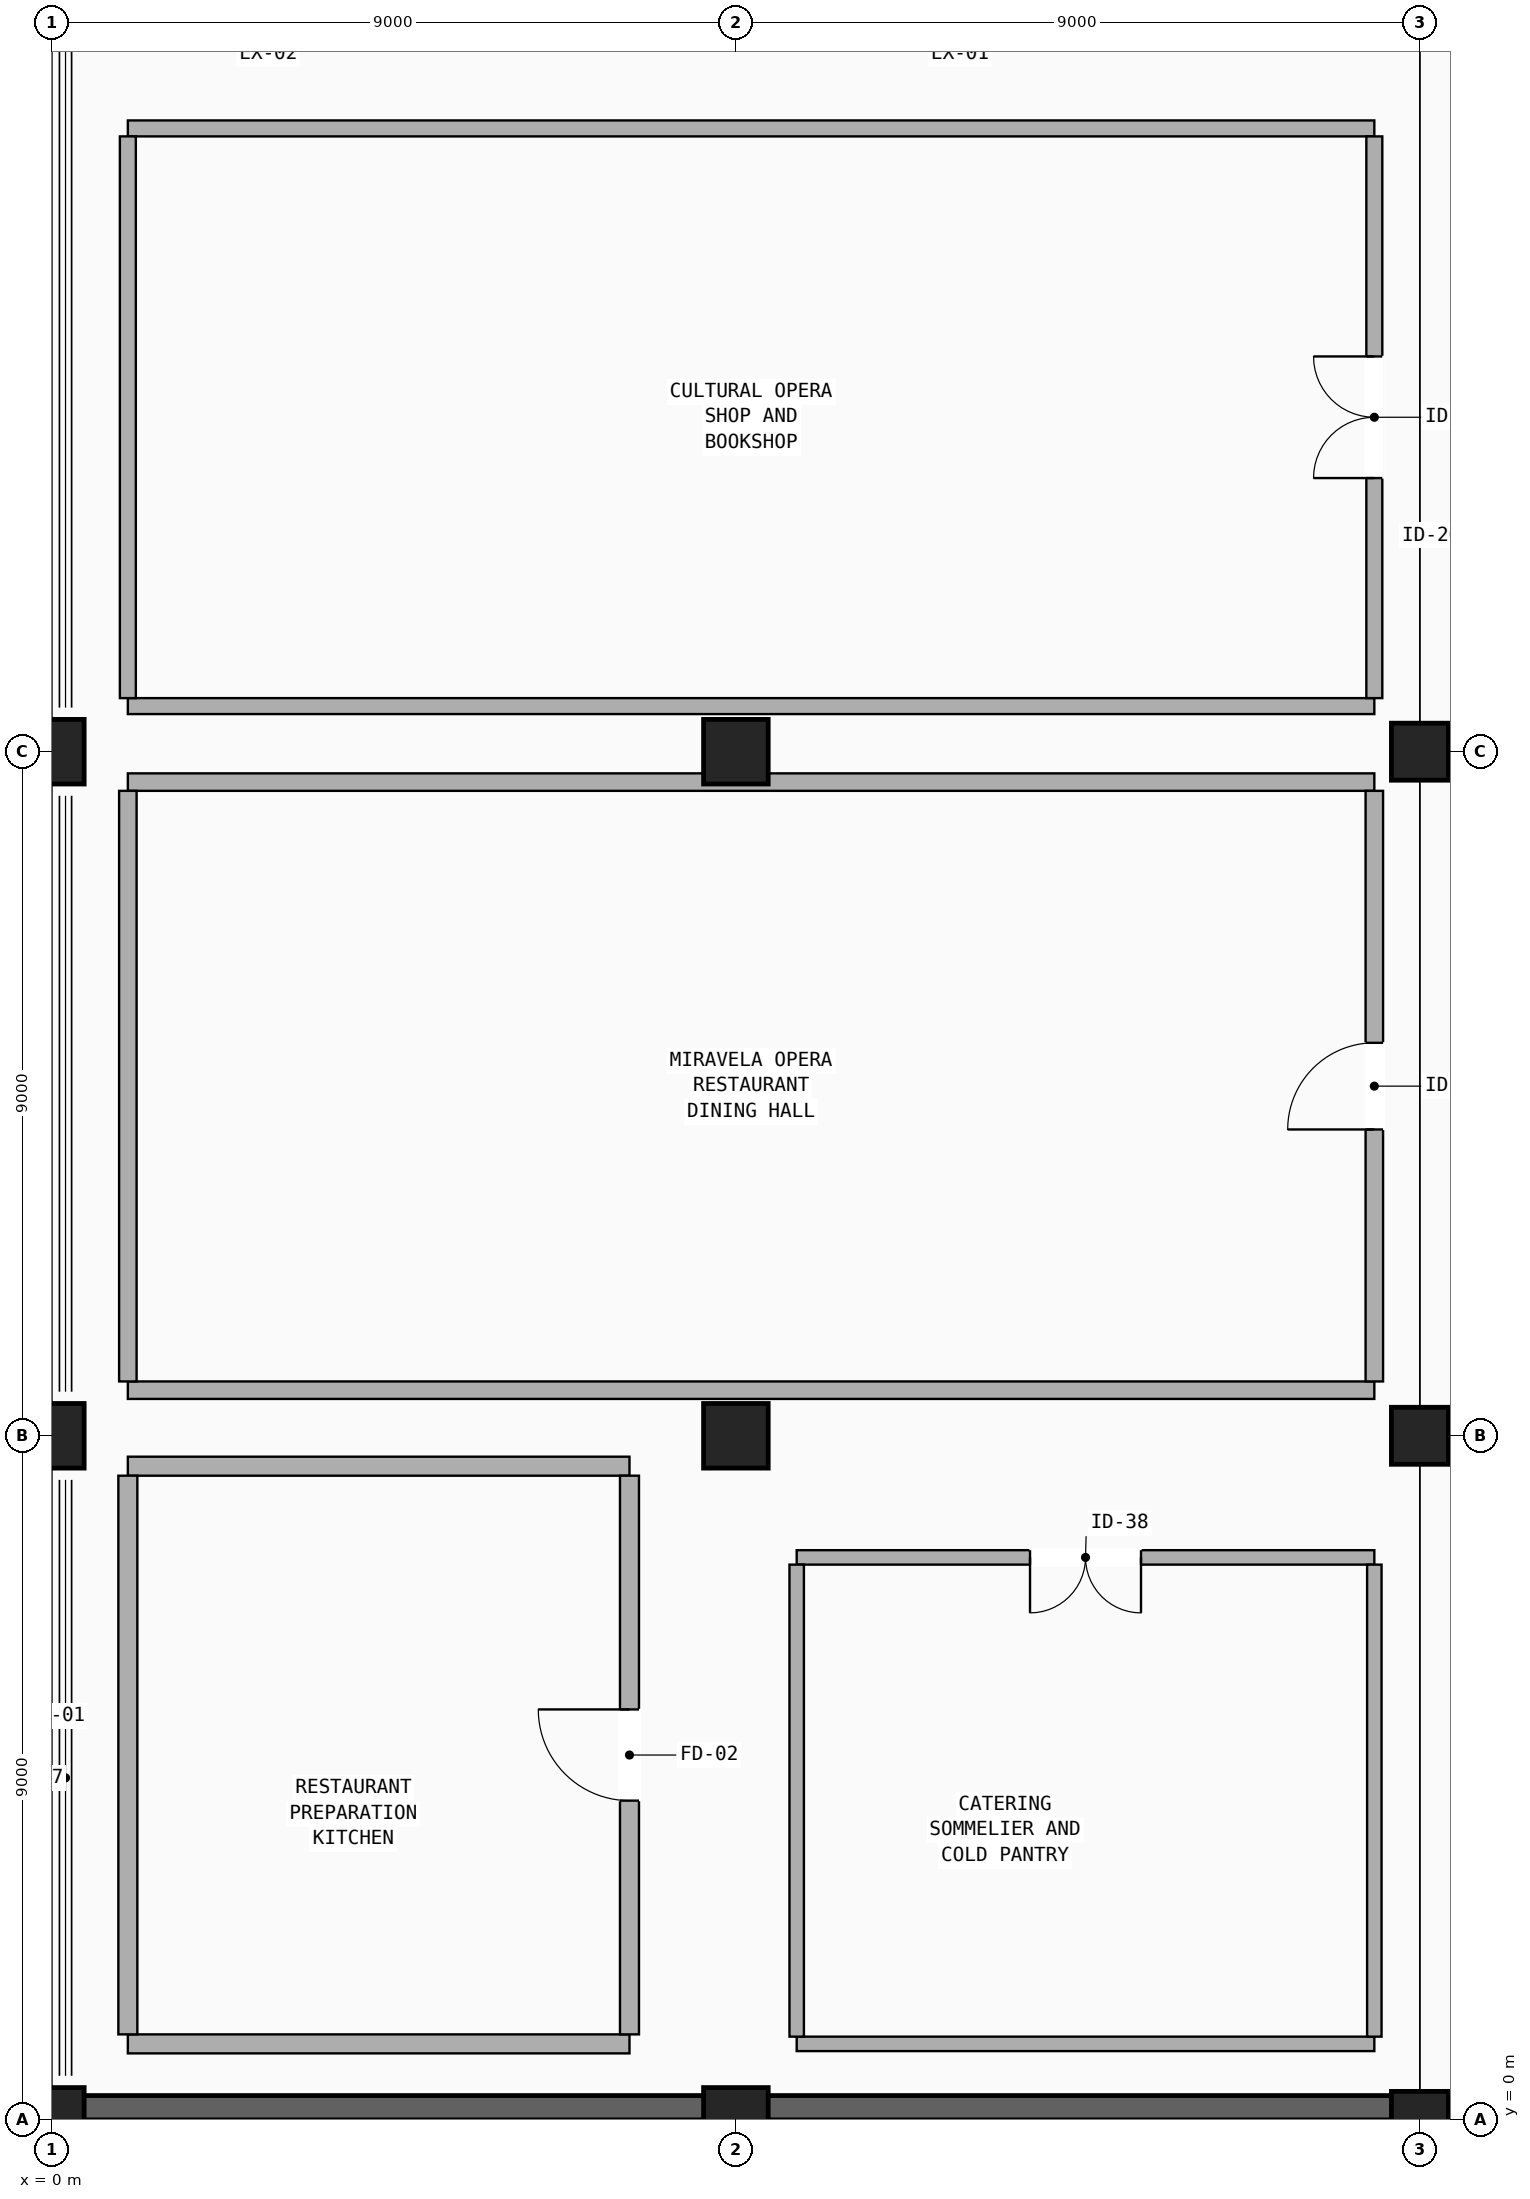
"""IFC4 building model, lengths in metres.
Left out: names, types, materials, properties, quantities, classifications, styles, units other than length and angle.
Written with IfcOpenShell. Run it as: python <this file> out.ifc"""

import sys

from ifc_helpers import new_model, si_unit, direction, frame, frame_2d, origin, origin_2d, place, context, subcontext, project, spatial, rectangle, circle, extrude, element, fill, save


model = new_model("IFC4")
c1 = context("Model", 3, precision=1e-05, world=origin(), true_north=direction((0.0, 1.0)))
c2 = subcontext(c1, "Body", "Model", "MODEL_VIEW")
j1 = project(units=[si_unit("LENGTHUNIT", "METRE"), si_unit("PLANEANGLEUNIT", "RADIAN")], contexts=[c1])
p1 = place(None, origin())
s1 = spatial("IfcSite", under=j1, at=p1, CompositionType="ELEMENT")
p2 = place(p1, origin())
s2 = spatial("IfcBuilding", under=s1, at=p2, CompositionType="ELEMENT")
p3 = place(p2, origin())
s3 = spatial("IfcBuildingStorey", under=s2, at=p3, CompositionType="ELEMENT", Elevation=0.0)
for number, where, z_axis, x_axis in (
    (1, (0.0, 0.0, 0.0), (0.0, 0.0, 1.0), (1.0, 0.0, 0.0)),
    (2, (0.0, 9.0, 0.0), (0.0, 0.0, 1.0), (1.0, 0.0, 0.0)),
    (3, (0.0, 18.0, 0.0), (0.0, 0.0, 1.0), (1.0, 0.0, 0.0)),
    (4, (9.0, 0.0, 0.0), (0.0, 0.0, 1.0), (1.0, 0.0, 0.0)),
    (5, (9.0, 9.0, 0.0), (0.0, 0.0, 1.0), (1.0, 0.0, 0.0)),
    (6, (9.0, 18.0, 0.0), (0.0, 0.0, 1.0), (1.0, 0.0, 0.0)),
):
    element("IfcColumn", number, at=place(p3, frame(where, z_axis=z_axis, x_axis=x_axis)), inside=s3, PredefinedType="COLUMN", context=c2, shape_type="SweptSolid", body=[
        extrude(circle(Radius=0.425, at=origin_2d()), origin(), (0.0, 0.0, 1.0), 5.1),
    ])
for number, where, z_axis, x_axis in (
    (7, (18.0, 0.0, 0.0), (0.0, 0.0, 1.0), (1.0, 0.0, 0.0)),
    (8, (18.0, 9.0, 0.0), (0.0, 0.0, 1.0), (1.0, 0.0, 0.0)),
    (9, (18.0, 18.0, 0.0), (0.0, 0.0, 1.0), (1.0, 0.0, 0.0)),
):
    element("IfcColumn", number, at=place(p3, frame(where, z_axis=z_axis, x_axis=x_axis)), inside=s3, PredefinedType="COLUMN", context=c2, shape_type="SweptSolid", body=[
        extrude(rectangle(XDim=0.75, YDim=0.75, at=origin_2d()), origin(), (0.0, 0.0, 1.0), 5.1),
    ])
p4 = place(p3, frame((0.35, 0.16, 0.0), z_axis=(0.0, 0.0, 1.0), x_axis=(1.0, 0.0, 0.0)))
e10 = element("IfcWall", 10, at=p4, inside=s3, PredefinedType="SHEAR", context=c2, shape_type="SweptSolid", body=[
    extrude(rectangle(XDim=62.95, YDim=0.32, at=frame_2d((31.475, 0.0))), origin(), (0.0, 0.0, 1.0), 5.1),
])
for number, where, z_axis, x_axis in (
    (11, (1.0, 18.6, 0.0), (0.0, 0.0, 1.0), (1.0, 0.0, 0.0)),
    (12, (1.0, 26.2, 0.0), (0.0, 0.0, 1.0), (1.0, 0.0, 0.0)),
):
    element("IfcWall", number, at=place(p3, frame(where, z_axis=z_axis, x_axis=x_axis)), inside=s3, PredefinedType="PARTITIONING", context=c2, shape_type="SweptSolid", body=[
        extrude(rectangle(XDim=16.4, YDim=0.21, at=frame_2d((8.2, 0.0))), origin(), (0.0, 0.0, 1.0), 3.98),
    ])
p5 = place(p3, frame((1.0, 18.705, 0.0), z_axis=(0.0, 0.0, 1.0), x_axis=(0.0, 1.0, 0.0)))
e13 = element("IfcWall", 13, at=p5, inside=s3, PredefinedType="PARTITIONING", context=c2, shape_type="SweptSolid", body=[
    extrude(rectangle(XDim=7.39, YDim=0.21, at=frame_2d((3.695, 0.0))), origin(), (0.0, 0.0, 1.0), 4.222),
])
p6 = place(p3, frame((17.4, 18.705, 0.0), z_axis=(0.0, 0.0, 1.0), x_axis=(0.0, 1.0, 0.0)))
e14 = element("IfcWall", 14, at=p6, inside=s3, PredefinedType="PARTITIONING", context=c2, shape_type="SweptSolid", body=[
    extrude(rectangle(XDim=7.39, YDim=0.21, at=frame_2d((3.695, 0.0))), origin(), (0.0, 0.0, 1.0), 4.37),
])
p7 = place(p6, frame((2.895, 0.0, 0.0)))
e15 = element("IfcOpeningElement", 15, at=p7, cuts=e14, PredefinedType="OPENING", context=c2, shape_type="SweptSolid", body=[
    extrude(rectangle(XDim=1.6, YDim=2.25, at=frame_2d((0.8, 1.125))), frame((0.0, 0.115, 0.0), z_axis=(0.0, -1.0, 0.0), x_axis=(1.0, 0.0, 0.0)), (0.0, 0.0, 1.0), 0.23),
])
p8 = place(p3, frame((1.0, 9.6, 0.0), z_axis=(0.0, 0.0, 1.0), x_axis=(1.0, 0.0, 0.0)))
e16 = element("IfcWall", 16, at=p8, inside=s3, PredefinedType="PARTITIONING", context=c2, shape_type="SweptSolid", body=[
    extrude(rectangle(XDim=16.4, YDim=0.23, at=frame_2d((8.2, 0.0))), origin(), (0.0, 0.0, 1.0), 4.18),
])
p9 = place(p3, frame((1.0, 17.6, 0.0), z_axis=(0.0, 0.0, 1.0), x_axis=(1.0, 0.0, 0.0)))
e17 = element("IfcWall", 17, at=p9, inside=s3, PredefinedType="PARTITIONING", context=c2, shape_type="SweptSolid", body=[
    extrude(rectangle(XDim=16.4, YDim=0.23, at=frame_2d((8.2, 0.0))), origin(), (0.0, 0.0, 1.0), 3.83),
])
p10 = place(p3, frame((1.0, 9.715, 0.0), z_axis=(0.0, 0.0, 1.0), x_axis=(0.0, 1.0, 0.0)))
e18 = element("IfcWall", 18, at=p10, inside=s3, PredefinedType="PARTITIONING", context=c2, shape_type="SweptSolid", body=[
    extrude(rectangle(XDim=7.77, YDim=0.23, at=frame_2d((3.885, 0.0))), origin(), (0.0, 0.0, 1.0), 4.297),
])
p11 = place(p3, frame((17.4, 9.715, 0.0), z_axis=(0.0, 0.0, 1.0), x_axis=(0.0, 1.0, 0.0)))
e19 = element("IfcWall", 19, at=p11, inside=s3, PredefinedType="PARTITIONING", context=c2, shape_type="SweptSolid", body=[
    extrude(rectangle(XDim=7.77, YDim=0.23, at=frame_2d((3.885, 0.0))), origin(), (0.0, 0.0, 1.0), 4.48),
])
p12 = place(p11, frame((3.315, 0.0, 0.0)))
e20 = element("IfcOpeningElement", 20, at=p12, cuts=e19, PredefinedType="OPENING", context=c2, shape_type="SweptSolid", body=[
    extrude(rectangle(XDim=1.14, YDim=2.08, at=frame_2d((0.57, 1.04))), frame((0.0, 0.125, 0.0), z_axis=(0.0, -1.0, 0.0), x_axis=(1.0, 0.0, 0.0)), (0.0, 0.0, 1.0), 0.25),
])
p13 = place(p3, frame((1.0, 1.0, 0.0), z_axis=(0.0, 0.0, 1.0), x_axis=(1.0, 0.0, 0.0)))
e21 = element("IfcWall", 21, at=p13, inside=s3, PredefinedType="PARTITIONING", context=c2, shape_type="SweptSolid", body=[
    extrude(rectangle(XDim=6.6, YDim=0.25, at=frame_2d((3.3, 0.0))), origin(), (0.0, 0.0, 1.0), 4.85),
])
p14 = place(p3, frame((1.0, 8.6, 0.0), z_axis=(0.0, 0.0, 1.0), x_axis=(1.0, 0.0, 0.0)))
e22 = element("IfcWall", 22, at=p14, inside=s3, PredefinedType="PARTITIONING", context=c2, shape_type="SweptSolid", body=[
    extrude(rectangle(XDim=6.6, YDim=0.25, at=frame_2d((3.3, 0.0))), origin(), (0.0, 0.0, 1.0), 4.08),
])
p15 = place(p3, frame((1.0, 1.125, 0.0), z_axis=(0.0, 0.0, 1.0), x_axis=(0.0, 1.0, 0.0)))
e23 = element("IfcWall", 23, at=p15, inside=s3, PredefinedType="PARTITIONING", context=c2, shape_type="SweptSolid", body=[
    extrude(rectangle(XDim=7.35, YDim=0.25, at=frame_2d((3.675, 0.0))), origin(), (0.0, 0.0, 1.0), 4.522),
])
p16 = place(p3, frame((7.6, 1.125, 0.0), z_axis=(0.0, 0.0, 1.0), x_axis=(0.0, 1.0, 0.0)))
e24 = element("IfcWall", 24, at=p16, inside=s3, PredefinedType="PARTITIONING", context=c2, shape_type="SweptSolid", body=[
    extrude(rectangle(XDim=7.35, YDim=0.25, at=frame_2d((3.675, 0.0))), origin(), (0.0, 0.0, 1.0), 4.522),
])
p17 = place(p16, frame((3.075, 0.0, 0.0)))
e25 = element("IfcOpeningElement", 25, at=p17, cuts=e24, PredefinedType="OPENING", context=c2, shape_type="SweptSolid", body=[
    extrude(rectangle(XDim=1.2, YDim=2.2, at=frame_2d((0.6, 1.1))), frame((0.0, 0.135, 0.0), z_axis=(0.0, -1.0, 0.0), x_axis=(1.0, 0.0, 0.0)), (0.0, 0.0, 1.0), 0.27),
])
p18 = place(p3, frame((9.8, 1.0, 0.0), z_axis=(0.0, 0.0, 1.0), x_axis=(1.0, 0.0, 0.0)))
e26 = element("IfcWall", 26, at=p18, inside=s3, PredefinedType="PARTITIONING", context=c2, shape_type="SweptSolid", body=[
    extrude(rectangle(XDim=7.6, YDim=0.19, at=frame_2d((3.8, 0.0))), origin(), (0.0, 0.0, 1.0), 4.85),
])
p19 = place(p3, frame((9.8, 7.4, 0.0), z_axis=(0.0, 0.0, 1.0), x_axis=(1.0, 0.0, 0.0)))
e27 = element("IfcWall", 27, at=p19, inside=s3, PredefinedType="PARTITIONING", context=c2, shape_type="SweptSolid", body=[
    extrude(rectangle(XDim=7.6, YDim=0.19, at=frame_2d((3.8, 0.0))), origin(), (0.0, 0.0, 1.0), 4.85),
])
p20 = place(p19, frame((3.07, 0.0, 0.0)))
e28 = element("IfcOpeningElement", 28, at=p20, cuts=e27, PredefinedType="OPENING", context=c2, shape_type="SweptSolid", body=[
    extrude(rectangle(XDim=1.46, YDim=2.14, at=frame_2d((0.73, 1.07))), frame((0.0, 0.105, 0.0), z_axis=(0.0, -1.0, 0.0), x_axis=(1.0, 0.0, 0.0)), (0.0, 0.0, 1.0), 0.21),
])
for number, where, z_axis, x_axis in (
    (29, (9.8, 1.095, 0.0), (0.0, 0.0, 1.0), (0.0, 1.0, 0.0)),
    (30, (17.4, 1.095, 0.0), (0.0, 0.0, 1.0), (0.0, 1.0, 0.0)),
):
    element("IfcWall", number, at=place(p3, frame(where, z_axis=z_axis, x_axis=x_axis)), inside=s3, PredefinedType="PARTITIONING", context=c2, shape_type="SweptSolid", body=[
        extrude(rectangle(XDim=6.21, YDim=0.19, at=frame_2d((3.105, 0.0))), origin(), (0.0, 0.0, 1.0), 4.23),
    ])
p21 = place(p7, origin())
e31 = element("IfcDoor", 31, at=p21, inside=s3, OperationType="DOUBLE_DOOR_SINGLE_SWING", PredefinedType="DOOR", context=c2, shape_type="SweptSolid", body=[
    extrude(rectangle(XDim=1.6, YDim=2.25, at=frame_2d((0.8, 1.125))), frame((0.0, 0.025, 0.0), z_axis=(0.0, -1.0, 0.0), x_axis=(1.0, 0.0, 0.0)), (0.0, 0.0, 1.0), 0.05),
])
fill(e15, e31)
p22 = place(p12, origin())
e32 = element("IfcDoor", 32, at=p22, inside=s3, OperationType="SINGLE_SWING_LEFT", PredefinedType="DOOR", context=c2, shape_type="SweptSolid", body=[
    extrude(rectangle(XDim=1.14, YDim=2.08, at=frame_2d((0.57, 1.04))), frame((0.0, 0.025, 0.0), z_axis=(0.0, -1.0, 0.0), x_axis=(1.0, 0.0, 0.0)), (0.0, 0.0, 1.0), 0.05),
])
fill(e20, e32)
p23 = place(p17, origin())
e33 = element("IfcDoor", 33, at=p23, inside=s3, OperationType="SINGLE_SWING_RIGHT", PredefinedType="DOOR", context=c2, shape_type="SweptSolid", body=[
    extrude(rectangle(XDim=1.2, YDim=2.2, at=frame_2d((0.6, 1.1))), frame((0.0, 0.025, 0.0), z_axis=(0.0, -1.0, 0.0), x_axis=(1.0, 0.0, 0.0)), (0.0, 0.0, 1.0), 0.05),
])
fill(e25, e33)
p24 = place(p20, frame((1.46, 0.0, 0.0), z_axis=(0.0, 0.0, 1.0), x_axis=(-1.0, 0.0, 0.0)))
e34 = element("IfcDoor", 34, at=p24, inside=s3, OperationType="DOUBLE_DOOR_SINGLE_SWING", PredefinedType="DOOR", context=c2, shape_type="SweptSolid", body=[
    extrude(rectangle(XDim=1.46, YDim=2.14, at=frame_2d((0.73, 1.07))), frame((0.0, 0.025, 0.0), z_axis=(0.0, -1.0, 0.0), x_axis=(1.0, 0.0, 0.0)), (0.0, 0.0, 1.0), 0.05),
])
fill(e28, e34)
save(model, sys.argv[1])
